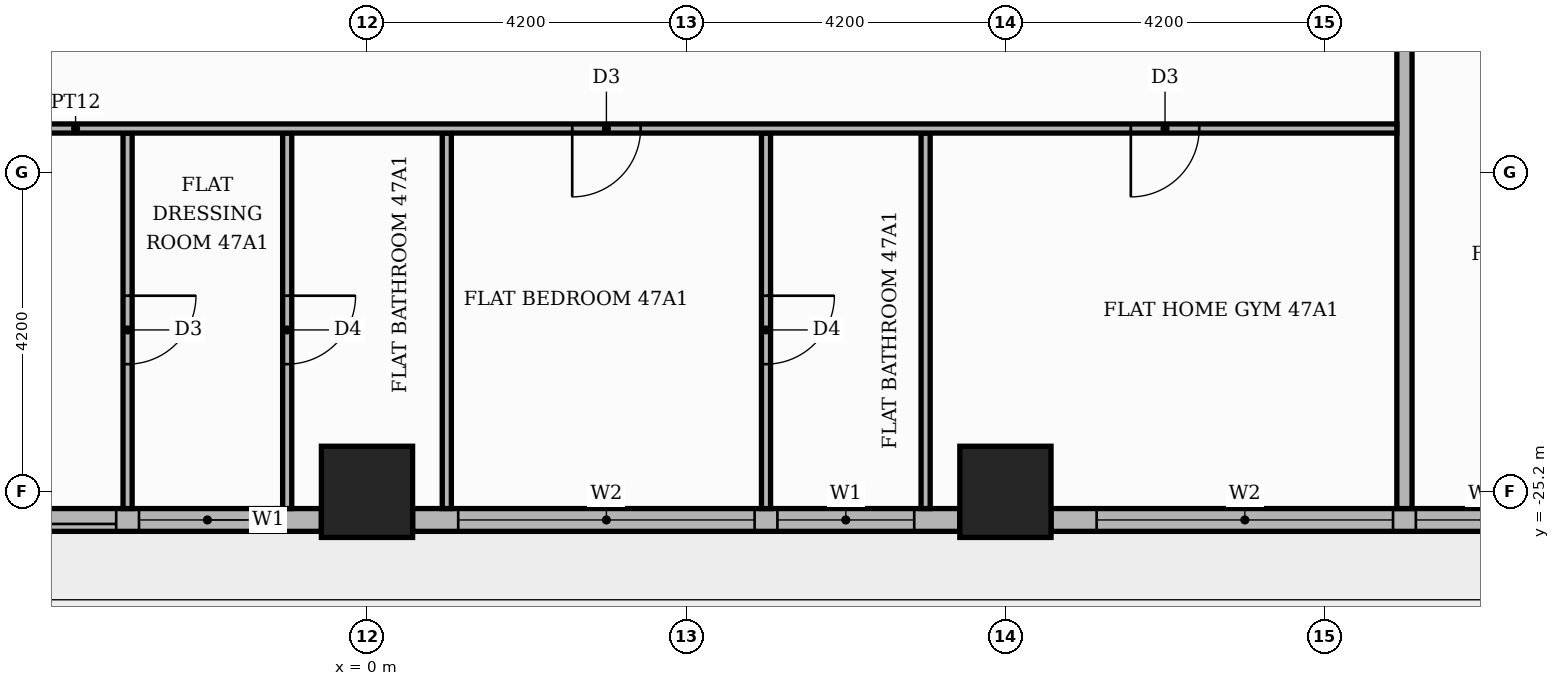
"""IFC4 building model, lengths in metres.
Left out: names, types, materials, properties, quantities, classifications, styles, units other than length and angle.
Written with IfcOpenShell. Run it as: python <this file> out.ifc"""

import sys

from ifc_helpers import new_model, si_unit, direction, frame, frame_2d, origin, origin_2d, place, context, subcontext, project, spatial, rectangle, extrude, element, fill, save


model = new_model("IFC4")
c1 = context("Model", 3, precision=1e-05, world=origin(), true_north=direction((0.0, 1.0)))
c2 = subcontext(c1, "Body", "Model", "MODEL_VIEW")
j1 = project(units=[si_unit("LENGTHUNIT", "METRE"), si_unit("PLANEANGLEUNIT", "RADIAN")], contexts=[c1])
p1 = place(None, origin())
s1 = spatial("IfcSite", under=j1, at=p1, CompositionType="ELEMENT")
p2 = place(p1, origin())
s2 = spatial("IfcBuilding", under=s1, at=p2, CompositionType="ELEMENT")
p3 = place(p2, frame((0.0, 0.0, 200.1)))
s3 = spatial("IfcBuildingStorey", under=s2, at=p3, CompositionType="ELEMENT", Elevation=200.1)
for number, where, z_axis, x_axis in (
    (1, (0.0, -25.2, 0.0), (0.0, 0.0, 1.0), (1.0, 0.0, 0.0)),
    (2, (8.4, -25.2, 0.0), (0.0, 0.0, 1.0), (1.0, 0.0, 0.0)),
):
    element("IfcColumn", number, at=place(p3, frame(where, z_axis=z_axis, x_axis=x_axis)), inside=s3, PredefinedType="COLUMN", context=c2, shape_type="SweptSolid", body=[
        extrude(rectangle(XDim=1.2, YDim=1.2, at=origin_2d()), origin(), (0.0, 0.0, 1.0), 3.9),
    ])
p4 = place(p3, frame((-7.8, -25.57, 0.0), z_axis=(0.0, 0.0, 1.0), x_axis=(1.0, 0.0, 0.0)))
e3 = element("IfcWall", 3, at=p4, inside=s3, PredefinedType="STANDARD", context=c2, shape_type="SweptSolid", body=[
    extrude(rectangle(XDim=7.2, YDim=0.3, at=frame_2d((3.6, 0.0))), origin(), (0.0, 0.0, 1.0), 3.48),
])
p5 = place(p4, frame((0.6, 0.0, 0.0)))
e4 = element("IfcOpeningElement", 4, at=p5, cuts=e3, PredefinedType="OPENING", context=c2, shape_type="SweptSolid", body=[
    extrude(rectangle(XDim=3.9, YDim=2.4, at=frame_2d((1.95, 1.2))), frame((0.0, 0.16, 0.0), z_axis=(0.0, -1.0, 0.0), x_axis=(1.0, 0.0, 0.0)), (0.0, 0.0, 1.0), 0.32),
])
p6 = place(p4, frame((4.8, 0.0, 0.9)))
e5 = element("IfcOpeningElement", 5, at=p6, cuts=e3, PredefinedType="OPENING", context=c2, shape_type="SweptSolid", body=[
    extrude(rectangle(XDim=1.8, YDim=2.1, at=frame_2d((0.9, 1.05))), frame((0.0, 0.16, 0.0), z_axis=(0.0, -1.0, 0.0), x_axis=(1.0, 0.0, 0.0)), (0.0, 0.0, 1.0), 0.32),
])
p7 = place(p3, frame((0.6, -25.57, 0.0), z_axis=(0.0, 0.0, 1.0), x_axis=(1.0, 0.0, 0.0)))
e6 = element("IfcWall", 6, at=p7, inside=s3, PredefinedType="STANDARD", context=c2, shape_type="SweptSolid", body=[
    extrude(rectangle(XDim=7.2, YDim=0.3, at=frame_2d((3.6, 0.0))), origin(), (0.0, 0.0, 1.0), 3.48),
])
p8 = place(p7, frame((0.6, 0.0, 0.9)))
e7 = element("IfcOpeningElement", 7, at=p8, cuts=e6, PredefinedType="OPENING", context=c2, shape_type="SweptSolid", body=[
    extrude(rectangle(XDim=3.9, YDim=2.1, at=frame_2d((1.95, 1.05))), frame((0.0, 0.16, 0.0), z_axis=(0.0, -1.0, 0.0), x_axis=(1.0, 0.0, 0.0)), (0.0, 0.0, 1.0), 0.32),
])
p9 = place(p7, frame((4.8, 0.0, 0.9)))
e8 = element("IfcOpeningElement", 8, at=p9, cuts=e6, PredefinedType="OPENING", context=c2, shape_type="SweptSolid", body=[
    extrude(rectangle(XDim=1.8, YDim=2.1, at=frame_2d((0.9, 1.05))), frame((0.0, 0.16, 0.0), z_axis=(0.0, -1.0, 0.0), x_axis=(1.0, 0.0, 0.0)), (0.0, 0.0, 1.0), 0.32),
])
p10 = place(p3, frame((9.0, -25.57, 0.0), z_axis=(0.0, 0.0, 1.0), x_axis=(1.0, 0.0, 0.0)))
e9 = element("IfcWall", 9, at=p10, inside=s3, PredefinedType="STANDARD", context=c2, shape_type="SweptSolid", body=[
    extrude(rectangle(XDim=7.2, YDim=0.3, at=frame_2d((3.6, 0.0))), origin(), (0.0, 0.0, 1.0), 3.48),
])
p11 = place(p10, frame((0.6, 0.0, 0.9)))
e10 = element("IfcOpeningElement", 10, at=p11, cuts=e9, PredefinedType="OPENING", context=c2, shape_type="SweptSolid", body=[
    extrude(rectangle(XDim=3.9, YDim=2.1, at=frame_2d((1.95, 1.05))), frame((0.0, 0.16, 0.0), z_axis=(0.0, -1.0, 0.0), x_axis=(1.0, 0.0, 0.0)), (0.0, 0.0, 1.0), 0.32),
])
p12 = place(p10, frame((4.8, 0.0, 0.9)))
e11 = element("IfcOpeningElement", 11, at=p12, cuts=e9, PredefinedType="OPENING", context=c2, shape_type="SweptSolid", body=[
    extrude(rectangle(XDim=1.8, YDim=2.1, at=frame_2d((0.9, 1.05))), frame((0.0, 0.16, 0.0), z_axis=(0.0, -1.0, 0.0), x_axis=(1.0, 0.0, 0.0)), (0.0, 0.0, 1.0), 0.32),
])
p13 = place(p3, frame((-3.15, -25.42, 0.0), z_axis=(0.0, 0.0, 1.0), x_axis=(0.0, 1.0, 0.0)))
e12 = element("IfcWall", 12, at=p13, inside=s3, PredefinedType="PARTITIONING", context=c2, shape_type="SweptSolid", body=[
    extrude(rectangle(XDim=4.94, YDim=0.12, at=frame_2d((2.47, 0.0))), origin(), (0.0, 0.0, 1.0), 3.48),
])
p14 = place(p13, frame((1.9, 0.0, 0.0)))
e13 = element("IfcOpeningElement", 13, at=p14, cuts=e12, PredefinedType="OPENING", context=c2, shape_type="SweptSolid", body=[
    extrude(rectangle(XDim=0.9, YDim=2.1, at=frame_2d((0.45, 1.05))), frame((0.0, 0.07, 0.0), z_axis=(0.0, -1.0, 0.0), x_axis=(1.0, 0.0, 0.0)), (0.0, 0.0, 1.0), 0.14),
])
p15 = place(p3, frame((-1.05, -25.42, 0.0), z_axis=(0.0, 0.0, 1.0), x_axis=(0.0, 1.0, 0.0)))
e14 = element("IfcWall", 14, at=p15, inside=s3, PredefinedType="PARTITIONING", context=c2, shape_type="SweptSolid", body=[
    extrude(rectangle(XDim=4.94, YDim=0.12, at=frame_2d((2.47, 0.0))), origin(), (0.0, 0.0, 1.0), 3.48),
])
p16 = place(p15, frame((1.9, 0.0, 0.0)))
e15 = element("IfcOpeningElement", 15, at=p16, cuts=e14, PredefinedType="OPENING", context=c2, shape_type="SweptSolid", body=[
    extrude(rectangle(XDim=0.9, YDim=2.1, at=frame_2d((0.45, 1.05))), frame((0.0, 0.07, 0.0), z_axis=(0.0, -1.0, 0.0), x_axis=(1.0, 0.0, 0.0)), (0.0, 0.0, 1.0), 0.14),
])
p17 = place(p3, frame((1.05, -25.42, 0.0), z_axis=(0.0, 0.0, 1.0), x_axis=(0.0, 1.0, 0.0)))
e16 = element("IfcWall", 16, at=p17, inside=s3, PredefinedType="PARTITIONING", context=c2, shape_type="SweptSolid", body=[
    extrude(rectangle(XDim=4.94, YDim=0.12, at=frame_2d((2.47, 0.0))), origin(), (0.0, 0.0, 1.0), 3.48),
])
p18 = place(p3, frame((5.25, -25.42, 0.0), z_axis=(0.0, 0.0, 1.0), x_axis=(0.0, 1.0, 0.0)))
e17 = element("IfcWall", 17, at=p18, inside=s3, PredefinedType="PARTITIONING", context=c2, shape_type="SweptSolid", body=[
    extrude(rectangle(XDim=4.94, YDim=0.12, at=frame_2d((2.47, 0.0))), origin(), (0.0, 0.0, 1.0), 3.48),
])
p19 = place(p18, frame((1.9, 0.0, 0.0)))
e18 = element("IfcOpeningElement", 18, at=p19, cuts=e17, PredefinedType="OPENING", context=c2, shape_type="SweptSolid", body=[
    extrude(rectangle(XDim=0.9, YDim=2.1, at=frame_2d((0.45, 1.05))), frame((0.0, 0.07, 0.0), z_axis=(0.0, -1.0, 0.0), x_axis=(1.0, 0.0, 0.0)), (0.0, 0.0, 1.0), 0.14),
])
p20 = place(p3, frame((7.35, -25.42, 0.0), z_axis=(0.0, 0.0, 1.0), x_axis=(0.0, 1.0, 0.0)))
e19 = element("IfcWall", 19, at=p20, inside=s3, PredefinedType="PARTITIONING", context=c2, shape_type="SweptSolid", body=[
    extrude(rectangle(XDim=4.94, YDim=0.12, at=frame_2d((2.47, 0.0))), origin(), (0.0, 0.0, 1.0), 3.48),
])
p21 = place(p3, frame((13.65, -25.42, 0.0), z_axis=(0.0, 0.0, 1.0), x_axis=(0.0, 1.0, 0.0)))
e20 = element("IfcWall", 20, at=p21, inside=s3, PredefinedType="PARTITIONING", context=c2, shape_type="SweptSolid", body=[
    extrude(rectangle(XDim=11.67, YDim=0.2, at=frame_2d((5.835, 0.0))), origin(), (0.0, 0.0, 1.0), 3.48),
])
p22 = place(p3, frame((-21.219, -20.42, 0.0), z_axis=(0.0, 0.0, 1.0), x_axis=(1.0, 0.0, 0.0)))
e21 = element("IfcWall", 21, at=p22, inside=s3, PredefinedType="PARTITIONING", context=c2, shape_type="SweptSolid", body=[
    extrude(rectangle(XDim=34.769, YDim=0.12, at=frame_2d((17.385, 0.0))), origin(), (0.0, 0.0, 1.0), 3.48),
])
p23 = place(p22, frame((8.119, 0.0, 0.0)))
e22 = element("IfcOpeningElement", 22, at=p23, cuts=e21, PredefinedType="OPENING", context=c2, shape_type="SweptSolid", body=[
    extrude(rectangle(XDim=1.0, YDim=2.1, at=frame_2d((0.5, 1.05))), frame((0.0, 0.07, 0.0), z_axis=(0.0, -1.0, 0.0), x_axis=(1.0, 0.0, 0.0)), (0.0, 0.0, 1.0), 0.14),
])
p24 = place(p22, frame((13.419, 0.0, 0.0)))
e23 = element("IfcOpeningElement", 23, at=p24, cuts=e21, PredefinedType="OPENING", context=c2, shape_type="SweptSolid", body=[
    extrude(rectangle(XDim=0.9, YDim=2.1, at=frame_2d((0.45, 1.05))), frame((0.0, 0.07, 0.0), z_axis=(0.0, -1.0, 0.0), x_axis=(1.0, 0.0, 0.0)), (0.0, 0.0, 1.0), 0.14),
])
p25 = place(p22, frame((23.919, 0.0, 0.0)))
e24 = element("IfcOpeningElement", 24, at=p25, cuts=e21, PredefinedType="OPENING", context=c2, shape_type="SweptSolid", body=[
    extrude(rectangle(XDim=0.9, YDim=2.1, at=frame_2d((0.45, 1.05))), frame((0.0, 0.07, 0.0), z_axis=(0.0, -1.0, 0.0), x_axis=(1.0, 0.0, 0.0)), (0.0, 0.0, 1.0), 0.14),
])
p26 = place(p22, frame((31.269, 0.0, 0.0)))
e25 = element("IfcOpeningElement", 25, at=p26, cuts=e21, PredefinedType="OPENING", context=c2, shape_type="SweptSolid", body=[
    extrude(rectangle(XDim=0.9, YDim=2.1, at=frame_2d((0.45, 1.05))), frame((0.0, 0.07, 0.0), z_axis=(0.0, -1.0, 0.0), x_axis=(1.0, 0.0, 0.0)), (0.0, 0.0, 1.0), 0.14),
])
p27 = place(p5, origin())
e26 = element("IfcDoor", 26, at=p27, inside=s3, OperationType="SLIDING_TO_LEFT", PredefinedType="DOOR", context=c2, shape_type="SweptSolid", body=[
    extrude(rectangle(XDim=3.9, YDim=2.4, at=frame_2d((1.95, 1.2))), frame((0.0, 0.025, 0.0), z_axis=(0.0, -1.0, 0.0), x_axis=(1.0, 0.0, 0.0)), (0.0, 0.0, 1.0), 0.05),
])
fill(e4, e26)
p28 = place(p6, origin())
e27 = element("IfcWindow", 27, at=p28, inside=s3, PartitioningType="SINGLE_PANEL", PredefinedType="WINDOW", context=c2, shape_type="SweptSolid", body=[
    extrude(rectangle(XDim=1.8, YDim=2.1, at=frame_2d((0.9, 1.05))), frame((0.0, 0.03, 0.0), z_axis=(0.0, -1.0, 0.0), x_axis=(1.0, 0.0, 0.0)), (0.0, 0.0, 1.0), 0.06),
])
fill(e5, e27)
p29 = place(p8, origin())
e28 = element("IfcWindow", 28, at=p29, inside=s3, PartitioningType="SINGLE_PANEL", PredefinedType="WINDOW", context=c2, shape_type="SweptSolid", body=[
    extrude(rectangle(XDim=3.9, YDim=2.1, at=frame_2d((1.95, 1.05))), frame((0.0, 0.03, 0.0), z_axis=(0.0, -1.0, 0.0), x_axis=(1.0, 0.0, 0.0)), (0.0, 0.0, 1.0), 0.06),
])
fill(e7, e28)
p30 = place(p9, origin())
e29 = element("IfcWindow", 29, at=p30, inside=s3, PartitioningType="SINGLE_PANEL", PredefinedType="WINDOW", context=c2, shape_type="SweptSolid", body=[
    extrude(rectangle(XDim=1.8, YDim=2.1, at=frame_2d((0.9, 1.05))), frame((0.0, 0.03, 0.0), z_axis=(0.0, -1.0, 0.0), x_axis=(1.0, 0.0, 0.0)), (0.0, 0.0, 1.0), 0.06),
])
fill(e8, e29)
p31 = place(p11, origin())
e30 = element("IfcWindow", 30, at=p31, inside=s3, PartitioningType="SINGLE_PANEL", PredefinedType="WINDOW", context=c2, shape_type="SweptSolid", body=[
    extrude(rectangle(XDim=3.9, YDim=2.1, at=frame_2d((1.95, 1.05))), frame((0.0, 0.03, 0.0), z_axis=(0.0, -1.0, 0.0), x_axis=(1.0, 0.0, 0.0)), (0.0, 0.0, 1.0), 0.06),
])
fill(e10, e30)
p32 = place(p12, origin())
e31 = element("IfcWindow", 31, at=p32, inside=s3, PartitioningType="SINGLE_PANEL", PredefinedType="WINDOW", context=c2, shape_type="SweptSolid", body=[
    extrude(rectangle(XDim=1.8, YDim=2.1, at=frame_2d((0.9, 1.05))), frame((0.0, 0.03, 0.0), z_axis=(0.0, -1.0, 0.0), x_axis=(1.0, 0.0, 0.0)), (0.0, 0.0, 1.0), 0.06),
])
fill(e11, e31)
p33 = place(p14, frame((0.9, 0.0, 0.0), z_axis=(0.0, 0.0, 1.0), x_axis=(-1.0, 0.0, 0.0)))
e32 = element("IfcDoor", 32, at=p33, inside=s3, OperationType="SINGLE_SWING_RIGHT", PredefinedType="DOOR", context=c2, shape_type="SweptSolid", body=[
    extrude(rectangle(XDim=0.9, YDim=2.1, at=frame_2d((0.45, 1.05))), frame((0.0, 0.025, 0.0), z_axis=(0.0, -1.0, 0.0), x_axis=(1.0, 0.0, 0.0)), (0.0, 0.0, 1.0), 0.05),
])
fill(e13, e32)
p34 = place(p16, frame((0.9, 0.0, 0.0), z_axis=(0.0, 0.0, 1.0), x_axis=(-1.0, 0.0, 0.0)))
e33 = element("IfcDoor", 33, at=p34, inside=s3, OperationType="SINGLE_SWING_RIGHT", PredefinedType="DOOR", context=c2, shape_type="SweptSolid", body=[
    extrude(rectangle(XDim=0.9, YDim=2.1, at=frame_2d((0.45, 1.05))), frame((0.0, 0.025, 0.0), z_axis=(0.0, -1.0, 0.0), x_axis=(1.0, 0.0, 0.0)), (0.0, 0.0, 1.0), 0.05),
])
fill(e15, e33)
p35 = place(p25, frame((0.9, 0.0, 0.0), z_axis=(0.0, 0.0, 1.0), x_axis=(-1.0, 0.0, 0.0)))
e34 = element("IfcDoor", 34, at=p35, inside=s3, OperationType="SINGLE_SWING_LEFT", PredefinedType="DOOR", context=c2, shape_type="SweptSolid", body=[
    extrude(rectangle(XDim=0.9, YDim=2.1, at=frame_2d((0.45, 1.05))), frame((0.0, 0.025, 0.0), z_axis=(0.0, -1.0, 0.0), x_axis=(1.0, 0.0, 0.0)), (0.0, 0.0, 1.0), 0.05),
])
fill(e24, e34)
p36 = place(p19, frame((0.9, 0.0, 0.0), z_axis=(0.0, 0.0, 1.0), x_axis=(-1.0, 0.0, 0.0)))
e35 = element("IfcDoor", 35, at=p36, inside=s3, OperationType="SINGLE_SWING_RIGHT", PredefinedType="DOOR", context=c2, shape_type="SweptSolid", body=[
    extrude(rectangle(XDim=0.9, YDim=2.1, at=frame_2d((0.45, 1.05))), frame((0.0, 0.025, 0.0), z_axis=(0.0, -1.0, 0.0), x_axis=(1.0, 0.0, 0.0)), (0.0, 0.0, 1.0), 0.05),
])
fill(e18, e35)
p37 = place(p26, frame((0.9, 0.0, 0.0), z_axis=(0.0, 0.0, 1.0), x_axis=(-1.0, 0.0, 0.0)))
e36 = element("IfcDoor", 36, at=p37, inside=s3, OperationType="SINGLE_SWING_LEFT", PredefinedType="DOOR", context=c2, shape_type="SweptSolid", body=[
    extrude(rectangle(XDim=0.9, YDim=2.1, at=frame_2d((0.45, 1.05))), frame((0.0, 0.025, 0.0), z_axis=(0.0, -1.0, 0.0), x_axis=(1.0, 0.0, 0.0)), (0.0, 0.0, 1.0), 0.05),
])
fill(e25, e36)
save(model, sys.argv[1])
